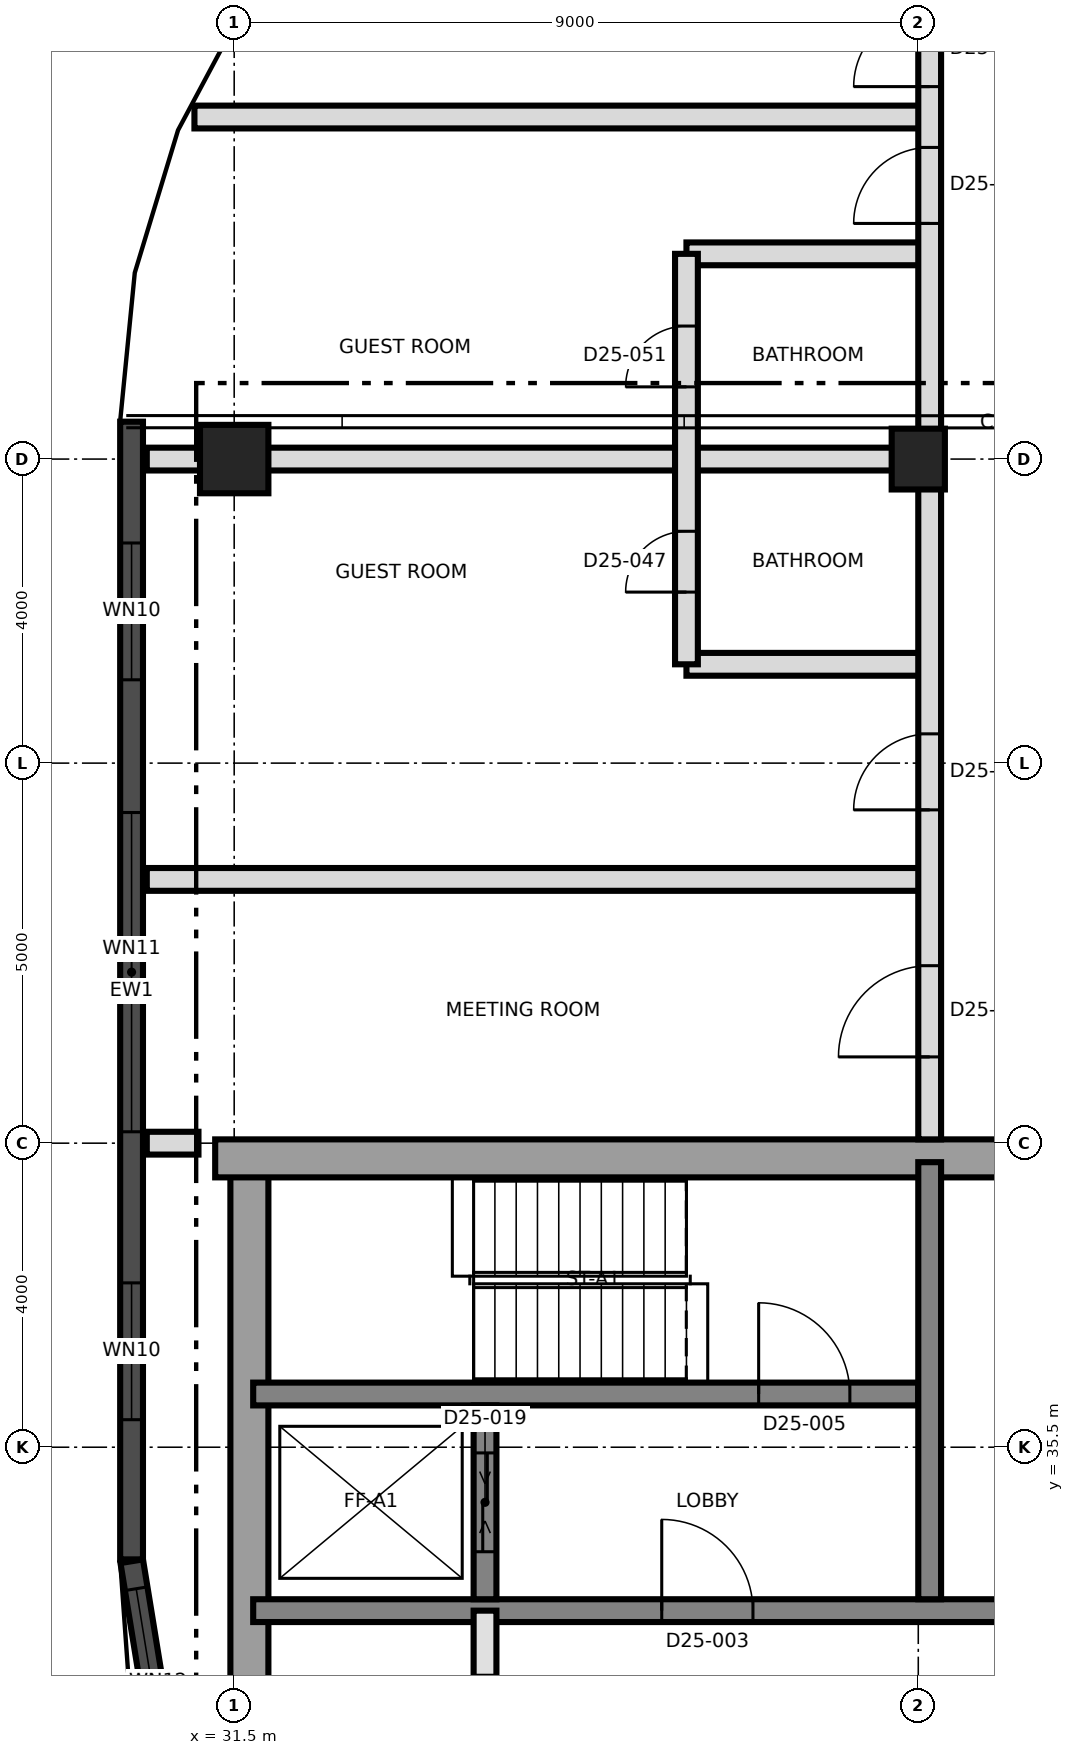
"""IFC4 building model, lengths in metres.
Left out: names, types, materials, properties, quantities, classifications, styles, units other than length and angle.
Written with IfcOpenShell. Run it as: python <this file> out.ifc"""

import sys

from ifc_helpers import new_model, si_unit, direction, frame, frame_2d, origin, origin_2d, place, context, subcontext, project, spatial, rectangle, extrude, element, fill, save


model = new_model("IFC4")
c1 = context("Model", 3, precision=1e-05, world=origin(), true_north=direction((0.0, 1.0)))
c2 = subcontext(c1, "Body", "Model", "MODEL_VIEW")
j1 = project(units=[si_unit("LENGTHUNIT", "METRE"), si_unit("PLANEANGLEUNIT", "RADIAN")], contexts=[c1])
p1 = place(None, origin())
s1 = spatial("IfcSite", under=j1, at=p1, CompositionType="ELEMENT")
p2 = place(p1, origin())
s2 = spatial("IfcBuilding", under=s1, at=p2, CompositionType="ELEMENT")
p3 = place(p2, frame((0.0, 0.0, 225.4)))
s3 = spatial("IfcBuildingStorey", under=s2, at=p3, CompositionType="ELEMENT", Elevation=225.4)
p4 = place(p3, frame((31.7, 21.75, 0.0), z_axis=(0.0, 0.0, 1.0), x_axis=(0.0, 1.0, 0.0)))
e1 = element("IfcWall", 1, at=p4, inside=s3, PredefinedType="SHEAR", context=c2, shape_type="SweptSolid", body=[
    extrude(rectangle(XDim=17.5, YDim=0.5, at=frame_2d((8.75, 0.0))), origin(), (0.0, 0.0, 1.0), 3.7),
])
p5 = place(p3, frame((31.25, 39.3, 0.0), z_axis=(0.0, 0.0, 1.0), x_axis=(1.0, 0.0, 0.0)))
e2 = element("IfcWall", 2, at=p5, inside=s3, PredefinedType="SHEAR", context=c2, shape_type="SweptSolid", body=[
    extrude(rectangle(XDim=27.0, YDim=0.5, at=frame_2d((13.5, 0.0))), origin(), (0.0, 0.0, 1.0), 3.7),
])
p6 = place(p5, frame((10.45, 0.0, 0.0)))
e3 = element("IfcOpeningElement", 3, at=p6, cuts=e2, PredefinedType="OPENING", context=c2, shape_type="SweptSolid", body=[
    extrude(rectangle(XDim=1.2, YDim=2.1, at=frame_2d((0.6, 1.05))), frame((0.0, 0.26, 0.0), z_axis=(0.0, -1.0, 0.0), x_axis=(1.0, 0.0, 0.0)), (0.0, 0.0, 1.0), 0.52),
])
p7 = place(p3, frame((31.75, 33.35, 0.0), z_axis=(0.0, 0.0, 1.0), x_axis=(1.0, 0.0, 0.0)))
e4 = element("IfcWall", 4, at=p7, inside=s3, PredefinedType="SHEAR", context=c2, shape_type="SweptSolid", body=[
    extrude(rectangle(XDim=26.5, YDim=0.3, at=frame_2d((13.25, 0.0))), origin(), (0.0, 0.0, 1.0), 3.7),
])
p8 = place(p7, frame((13.9, 0.0, 0.0)))
e5 = element("IfcOpeningElement", 5, at=p8, cuts=e4, PredefinedType="OPENING", context=c2, shape_type="SweptSolid", body=[
    extrude(rectangle(XDim=1.4, YDim=2.1, at=frame_2d((0.7, 1.05))), frame((0.0, 0.16, 0.0), z_axis=(0.0, -1.0, 0.0), x_axis=(1.0, 0.0, 0.0)), (0.0, 0.0, 1.0), 0.32),
])
p9 = place(p7, frame((5.375, 0.0, 0.0)))
e6 = element("IfcOpeningElement", 6, at=p9, cuts=e4, PredefinedType="OPENING", context=c2, shape_type="SweptSolid", body=[
    extrude(rectangle(XDim=1.2, YDim=2.1, at=frame_2d((0.6, 1.05))), frame((0.0, 0.16, 0.0), z_axis=(0.0, -1.0, 0.0), x_axis=(1.0, 0.0, 0.0)), (0.0, 0.0, 1.0), 0.32),
])
p10 = place(p7, frame((19.925, 0.0, 0.0)))
e7 = element("IfcOpeningElement", 7, at=p10, cuts=e4, PredefinedType="OPENING", context=c2, shape_type="SweptSolid", body=[
    extrude(rectangle(XDim=1.2, YDim=2.1, at=frame_2d((0.6, 1.05))), frame((0.0, 0.16, 0.0), z_axis=(0.0, -1.0, 0.0), x_axis=(1.0, 0.0, 0.0)), (0.0, 0.0, 1.0), 0.32),
])
p11 = place(p3, frame((31.75, 36.2, 0.0), z_axis=(0.0, 0.0, 1.0), x_axis=(1.0, 0.0, 0.0)))
e8 = element("IfcWall", 8, at=p11, inside=s3, PredefinedType="SHEAR", context=c2, shape_type="SweptSolid", body=[
    extrude(rectangle(XDim=8.75, YDim=0.3, at=frame_2d((4.375, 0.0))), origin(), (0.0, 0.0, 1.0), 3.7),
])
p12 = place(p11, frame((6.65, 0.0, 0.0)))
e9 = element("IfcOpeningElement", 9, at=p12, cuts=e8, PredefinedType="OPENING", context=c2, shape_type="SweptSolid", body=[
    extrude(rectangle(XDim=1.2, YDim=2.1, at=frame_2d((0.6, 1.05))), frame((0.0, 0.16, 0.0), z_axis=(0.0, -1.0, 0.0), x_axis=(1.0, 0.0, 0.0)), (0.0, 0.0, 1.0), 0.32),
])
p13 = place(p3, frame((40.65, 33.5, 0.0), z_axis=(0.0, 0.0, 1.0), x_axis=(0.0, 1.0, 0.0)))
e10 = element("IfcWall", 10, at=p13, inside=s3, PredefinedType="SHEAR", context=c2, shape_type="SweptSolid", body=[
    extrude(rectangle(XDim=5.75, YDim=0.3, at=frame_2d((2.875, 0.0))), origin(), (0.0, 0.0, 1.0), 3.7),
])
p14 = place(p3, frame((34.8, 33.5, 0.0), z_axis=(0.0, 0.0, 1.0), x_axis=(0.0, 1.0, 0.0)))
e11 = element("IfcWall", 11, at=p14, inside=s3, PredefinedType="SHEAR", context=c2, shape_type="SweptSolid", body=[
    extrude(rectangle(XDim=2.55, YDim=0.3, at=frame_2d((1.275, 0.0))), origin(), (0.0, 0.0, 1.0), 3.7),
])
p15 = place(p14, frame((0.625, 0.0, 0.0)))
e12 = element("IfcOpeningElement", 12, at=p15, cuts=e11, PredefinedType="OPENING", context=c2, shape_type="SweptSolid", body=[
    extrude(rectangle(XDim=1.3, YDim=2.4, at=frame_2d((0.65, 1.2))), frame((0.0, 0.16, 0.0), z_axis=(0.0, -1.0, 0.0), x_axis=(1.0, 0.0, 0.0)), (0.0, 0.0, 1.0), 0.32),
])
p16 = place(p3, frame((31.5, 48.5, 0.0), z_axis=(0.0, 0.0, 1.0), x_axis=(1.0, 0.0, 0.0)))
e13 = element("IfcColumn", 13, at=p16, inside=s3, PredefinedType="COLUMN", context=c2, shape_type="SweptSolid", body=[
    extrude(rectangle(XDim=0.9, YDim=0.9, at=origin_2d()), origin(), (0.0, 0.0, 1.0), 3.7),
])
p17 = place(p3, frame((40.5, 48.5, 0.0), z_axis=(0.0, 0.0, 1.0), x_axis=(0.0, 1.0, 0.0)))
e14 = element("IfcColumn", 14, at=p17, inside=s3, PredefinedType="COLUMN", context=c2, shape_type="SweptSolid", body=[
    extrude(rectangle(XDim=0.8, YDim=0.7, at=origin_2d()), origin(), (0.0, 0.0, 1.0), 3.7),
])
p18 = place(p3, frame((30.15, 48.992, 0.0), z_axis=(0.0, 0.0, 1.0), x_axis=(0.0, -1.0, 0.0)))
e15 = element("IfcWall", 15, at=p18, inside=s3, PredefinedType="SOLIDWALL", context=c2, shape_type="SweptSolid", body=[
    extrude(rectangle(XDim=14.968, YDim=0.3, at=frame_2d((7.484, 0.0))), origin(), (0.0, 0.0, 1.0), 3.4),
])
p19 = place(p18, frame((1.596, 0.0, 0.3)))
e16 = element("IfcOpeningElement", 16, at=p19, cuts=e15, PredefinedType="OPENING", context=c2, shape_type="SweptSolid", body=[
    extrude(rectangle(XDim=1.8, YDim=2.4, at=frame_2d((0.9, 1.2))), frame((0.0, 0.16, 0.0), z_axis=(0.0, -1.0, 0.0), x_axis=(1.0, 0.0, 0.0)), (0.0, 0.0, 1.0), 0.32),
])
p20 = place(p18, frame((5.142, 0.0, 0.9)))
e17 = element("IfcOpeningElement", 17, at=p20, cuts=e15, PredefinedType="OPENING", context=c2, shape_type="SweptSolid", body=[
    extrude(rectangle(XDim=4.2, YDim=1.5, at=frame_2d((2.1, 0.75))), frame((0.0, 0.16, 0.0), z_axis=(0.0, -1.0, 0.0), x_axis=(1.0, 0.0, 0.0)), (0.0, 0.0, 1.0), 0.32),
])
p21 = place(p18, frame((11.33, 0.0, 0.3)))
e18 = element("IfcOpeningElement", 18, at=p21, cuts=e15, PredefinedType="OPENING", context=c2, shape_type="SweptSolid", body=[
    extrude(rectangle(XDim=1.8, YDim=2.4, at=frame_2d((0.9, 1.2))), frame((0.0, 0.16, 0.0), z_axis=(0.0, -1.0, 0.0), x_axis=(1.0, 0.0, 0.0)), (0.0, 0.0, 1.0), 0.32),
])
p22 = place(p3, frame((30.152, 34.0, 0.0), z_axis=(0.0, 0.0, 1.0), x_axis=(0.160697303067, -0.987003736967, 0.0)))
e19 = element("IfcWall", 19, at=p22, inside=s3, PredefinedType="SOLIDWALL", context=c2, shape_type="SweptSolid", body=[
    extrude(rectangle(XDim=4.333, YDim=0.3, at=frame_2d((2.167, 0.0))), origin(), (0.0, 0.0, 1.0), 3.4),
])
p23 = place(p22, frame((0.366, 0.0, 0.9)))
e20 = element("IfcOpeningElement", 20, at=p23, cuts=e19, PredefinedType="OPENING", context=c2, shape_type="SweptSolid", body=[
    extrude(rectangle(XDim=3.6, YDim=1.5, at=frame_2d((1.8, 0.75))), frame((0.0, 0.16, 0.0), z_axis=(0.0, -1.0, 0.0), x_axis=(1.0, 0.0, 0.0)), (0.0, 0.0, 1.0), 0.32),
])
p24 = place(p3, frame((34.8, 30.65, 0.0), z_axis=(0.0, 0.0, 1.0), x_axis=(0.0, 1.0, 0.0)))
e21 = element("IfcWall", 21, at=p24, inside=s3, PredefinedType="SOLIDWALL", context=c2, shape_type="SweptSolid", body=[
    extrude(rectangle(XDim=2.7, YDim=0.3, at=frame_2d((1.35, 0.0))), origin(), (0.0, 0.0, 1.0), 3.4),
])
p25 = place(p24, frame((0.85, 0.0, 0.0)))
e22 = element("IfcOpeningElement", 22, at=p25, cuts=e21, PredefinedType="OPENING", context=c2, shape_type="SweptSolid", body=[
    extrude(rectangle(XDim=1.0, YDim=2.1, at=frame_2d((0.5, 1.05))), frame((0.0, 0.16, 0.0), z_axis=(0.0, -1.0, 0.0), x_axis=(1.0, 0.0, 0.0)), (0.0, 0.0, 1.0), 0.32),
])
p26 = place(p3, frame((30.35, 39.5, 0.0), z_axis=(0.0, 0.0, 1.0), x_axis=(1.0, 0.0, 0.0)))
e23 = element("IfcWall", 23, at=p26, inside=s3, PredefinedType="PARTITIONING", context=c2, shape_type="SweptSolid", body=[
    extrude(rectangle(XDim=0.68, YDim=0.3, at=frame_2d((0.34, 0.0))), origin(), (0.0, 0.0, 1.0), 3.4),
])
p27 = place(p3, frame((30.35, 42.97, 0.0), z_axis=(0.0, 0.0, 1.0), x_axis=(1.0, 0.0, 0.0)))
e24 = element("IfcWall", 24, at=p27, inside=s3, PredefinedType="PARTITIONING", context=c2, shape_type="SweptSolid", body=[
    extrude(rectangle(XDim=10.3, YDim=0.3, at=frame_2d((5.15, 0.0))), origin(), (0.0, 0.0, 1.0), 3.4),
])
p28 = place(p3, frame((37.45, 45.8, 0.0), z_axis=(0.0, 0.0, 1.0), x_axis=(1.0, 0.0, 0.0)))
e25 = element("IfcWall", 25, at=p28, inside=s3, PredefinedType="PARTITIONING", context=c2, shape_type="SweptSolid", body=[
    extrude(rectangle(XDim=3.2, YDim=0.3, at=frame_2d((1.6, 0.0))), origin(), (0.0, 0.0, 1.0), 3.4),
])
p29 = place(p3, frame((30.35, 48.5, 0.0), z_axis=(0.0, 0.0, 1.0), x_axis=(1.0, 0.0, 0.0)))
e26 = element("IfcWall", 26, at=p29, inside=s3, PredefinedType="PARTITIONING", context=c2, shape_type="SweptSolid", body=[
    extrude(rectangle(XDim=10.3, YDim=0.3, at=frame_2d((5.15, 0.0))), origin(), (0.0, 0.0, 1.0), 3.4),
])
p30 = place(p3, frame((37.45, 51.2, 0.0), z_axis=(0.0, 0.0, 1.0), x_axis=(1.0, 0.0, 0.0)))
e27 = element("IfcWall", 27, at=p30, inside=s3, PredefinedType="PARTITIONING", context=c2, shape_type="SweptSolid", body=[
    extrude(rectangle(XDim=3.2, YDim=0.3, at=frame_2d((1.6, 0.0))), origin(), (0.0, 0.0, 1.0), 3.4),
])
p31 = place(p3, frame((30.977, 53.0, 0.0), z_axis=(0.0, 0.0, 1.0), x_axis=(1.0, 0.0, 0.0)))
e28 = element("IfcWall", 28, at=p31, inside=s3, PredefinedType="PARTITIONING", context=c2, shape_type="SweptSolid", body=[
    extrude(rectangle(XDim=9.673, YDim=0.3, at=frame_2d((4.836, 0.0))), origin(), (0.0, 0.0, 1.0), 3.4),
])
p32 = place(p3, frame((37.45, 45.8, 0.0), z_axis=(0.0, 0.0, 1.0), x_axis=(0.0, 1.0, 0.0)))
e29 = element("IfcWall", 29, at=p32, inside=s3, PredefinedType="PARTITIONING", context=c2, shape_type="SweptSolid", body=[
    extrude(rectangle(XDim=5.4, YDim=0.3, at=frame_2d((2.7, 0.0))), origin(), (0.0, 0.0, 1.0), 3.4),
])
p33 = place(p32, frame((0.95, 0.0, 0.0)))
e30 = element("IfcOpeningElement", 30, at=p33, cuts=e29, PredefinedType="OPENING", context=c2, shape_type="SweptSolid", body=[
    extrude(rectangle(XDim=0.8, YDim=2.1, at=frame_2d((0.4, 1.05))), frame((0.0, 0.16, 0.0), z_axis=(0.0, -1.0, 0.0), x_axis=(1.0, 0.0, 0.0)), (0.0, 0.0, 1.0), 0.32),
])
p34 = place(p32, frame((3.65, 0.0, 0.0)))
e31 = element("IfcOpeningElement", 31, at=p34, cuts=e29, PredefinedType="OPENING", context=c2, shape_type="SweptSolid", body=[
    extrude(rectangle(XDim=0.8, YDim=2.1, at=frame_2d((0.4, 1.05))), frame((0.0, 0.16, 0.0), z_axis=(0.0, -1.0, 0.0), x_axis=(1.0, 0.0, 0.0)), (0.0, 0.0, 1.0), 0.32),
])
p35 = place(p3, frame((40.65, 39.55, 0.0), z_axis=(0.0, 0.0, 1.0), x_axis=(0.0, 1.0, 0.0)))
e32 = element("IfcWall", 32, at=p35, inside=s3, PredefinedType="PARTITIONING", context=c2, shape_type="SweptSolid", body=[
    extrude(rectangle(XDim=19.0, YDim=0.3, at=frame_2d((9.5, 0.0))), origin(), (0.0, 0.0, 1.0), 3.4),
])
p36 = place(p35, frame((1.085, 0.0, 0.0)))
e33 = element("IfcOpeningElement", 33, at=p36, cuts=e32, PredefinedType="OPENING", context=c2, shape_type="SweptSolid", body=[
    extrude(rectangle(XDim=1.2, YDim=2.1, at=frame_2d((0.6, 1.05))), frame((0.0, 0.16, 0.0), z_axis=(0.0, -1.0, 0.0), x_axis=(1.0, 0.0, 0.0)), (0.0, 0.0, 1.0), 0.32),
])
p37 = place(p35, frame((4.335, 0.0, 0.0)))
e34 = element("IfcOpeningElement", 34, at=p37, cuts=e32, PredefinedType="OPENING", context=c2, shape_type="SweptSolid", body=[
    extrude(rectangle(XDim=1.0, YDim=2.1, at=frame_2d((0.5, 1.05))), frame((0.0, 0.16, 0.0), z_axis=(0.0, -1.0, 0.0), x_axis=(1.0, 0.0, 0.0)), (0.0, 0.0, 1.0), 0.32),
])
p38 = place(p35, frame((12.05, 0.0, 0.0)))
e35 = element("IfcOpeningElement", 35, at=p38, cuts=e32, PredefinedType="OPENING", context=c2, shape_type="SweptSolid", body=[
    extrude(rectangle(XDim=1.0, YDim=2.1, at=frame_2d((0.5, 1.05))), frame((0.0, 0.16, 0.0), z_axis=(0.0, -1.0, 0.0), x_axis=(1.0, 0.0, 0.0)), (0.0, 0.0, 1.0), 0.32),
])
p39 = place(p35, frame((13.85, 0.0, 0.0)))
e36 = element("IfcOpeningElement", 36, at=p39, cuts=e32, PredefinedType="OPENING", context=c2, shape_type="SweptSolid", body=[
    extrude(rectangle(XDim=1.0, YDim=2.1, at=frame_2d((0.5, 1.05))), frame((0.0, 0.16, 0.0), z_axis=(0.0, -1.0, 0.0), x_axis=(1.0, 0.0, 0.0)), (0.0, 0.0, 1.0), 0.32),
])
p40 = place(p19, origin())
e37 = element("IfcWindow", 37, at=p40, inside=s3, PartitioningType="SINGLE_PANEL", PredefinedType="WINDOW", context=c2, shape_type="SweptSolid", body=[
    extrude(rectangle(XDim=1.8, YDim=2.4, at=frame_2d((0.9, 1.2))), frame((0.0, 0.03, 0.0), z_axis=(0.0, -1.0, 0.0), x_axis=(1.0, 0.0, 0.0)), (0.0, 0.0, 1.0), 0.06),
])
fill(e16, e37)
p41 = place(p20, origin())
e38 = element("IfcWindow", 38, at=p41, inside=s3, PartitioningType="SINGLE_PANEL", PredefinedType="WINDOW", context=c2, shape_type="SweptSolid", body=[
    extrude(rectangle(XDim=4.2, YDim=1.5, at=frame_2d((2.1, 0.75))), frame((0.0, 0.03, 0.0), z_axis=(0.0, -1.0, 0.0), x_axis=(1.0, 0.0, 0.0)), (0.0, 0.0, 1.0), 0.06),
])
fill(e17, e38)
p42 = place(p21, origin())
e39 = element("IfcWindow", 39, at=p42, inside=s3, PartitioningType="SINGLE_PANEL", PredefinedType="WINDOW", context=c2, shape_type="SweptSolid", body=[
    extrude(rectangle(XDim=1.8, YDim=2.4, at=frame_2d((0.9, 1.2))), frame((0.0, 0.03, 0.0), z_axis=(0.0, -1.0, 0.0), x_axis=(1.0, 0.0, 0.0)), (0.0, 0.0, 1.0), 0.06),
])
fill(e18, e39)
p43 = place(p23, origin())
e40 = element("IfcWindow", 40, at=p43, inside=s3, PartitioningType="SINGLE_PANEL", PredefinedType="WINDOW", context=c2, shape_type="SweptSolid", body=[
    extrude(rectangle(XDim=3.6, YDim=1.5, at=frame_2d((1.8, 0.75))), frame((0.0, 0.03, 0.0), z_axis=(0.0, -1.0, 0.0), x_axis=(1.0, 0.0, 0.0)), (0.0, 0.0, 1.0), 0.06),
])
fill(e20, e40)
p44 = place(p9, origin())
e41 = element("IfcDoor", 41, at=p44, inside=s3, OperationType="SINGLE_SWING_LEFT", PredefinedType="DOOR", context=c2, shape_type="SweptSolid", body=[
    extrude(rectangle(XDim=1.2, YDim=2.1, at=frame_2d((0.6, 1.05))), frame((0.0, 0.025, 0.0), z_axis=(0.0, -1.0, 0.0), x_axis=(1.0, 0.0, 0.0)), (0.0, 0.0, 1.0), 0.05),
])
fill(e6, e41)
p45 = place(p12, origin())
e42 = element("IfcDoor", 42, at=p45, inside=s3, OperationType="SINGLE_SWING_RIGHT", PredefinedType="DOOR", context=c2, shape_type="SweptSolid", body=[
    extrude(rectangle(XDim=1.2, YDim=2.1, at=frame_2d((0.6, 1.05))), frame((0.0, 0.025, 0.0), z_axis=(0.0, -1.0, 0.0), x_axis=(1.0, 0.0, 0.0)), (0.0, 0.0, 1.0), 0.05),
])
fill(e9, e42)
p46 = place(p15, origin())
e43 = element("IfcDoor", 43, at=p46, inside=s3, OperationType="SLIDING_TO_LEFT", PredefinedType="DOOR", context=c2, shape_type="SweptSolid", body=[
    extrude(rectangle(XDim=1.3, YDim=2.4, at=frame_2d((0.65, 1.2))), frame((0.0, 0.025, 0.0), z_axis=(0.0, -1.0, 0.0), x_axis=(1.0, 0.0, 0.0)), (0.0, 0.0, 1.0), 0.05),
])
fill(e12, e43)
p47 = place(p36, origin())
e44 = element("IfcDoor", 44, at=p47, inside=s3, OperationType="SINGLE_SWING_RIGHT", PredefinedType="DOOR", context=c2, shape_type="SweptSolid", body=[
    extrude(rectangle(XDim=1.2, YDim=2.1, at=frame_2d((0.6, 1.05))), frame((0.0, 0.025, 0.0), z_axis=(0.0, -1.0, 0.0), x_axis=(1.0, 0.0, 0.0)), (0.0, 0.0, 1.0), 0.05),
])
fill(e33, e44)
p48 = place(p33, origin())
e45 = element("IfcDoor", 45, at=p48, inside=s3, OperationType="SINGLE_SWING_LEFT", PredefinedType="DOOR", context=c2, shape_type="SweptSolid", body=[
    extrude(rectangle(XDim=0.8, YDim=2.1, at=frame_2d((0.4, 1.05))), frame((0.0, 0.025, 0.0), z_axis=(0.0, -1.0, 0.0), x_axis=(1.0, 0.0, 0.0)), (0.0, 0.0, 1.0), 0.05),
])
fill(e30, e45)
p49 = place(p37, origin())
e46 = element("IfcDoor", 46, at=p49, inside=s3, OperationType="SINGLE_SWING_LEFT", PredefinedType="DOOR", context=c2, shape_type="SweptSolid", body=[
    extrude(rectangle(XDim=1.0, YDim=2.1, at=frame_2d((0.5, 1.05))), frame((0.0, 0.025, 0.0), z_axis=(0.0, -1.0, 0.0), x_axis=(1.0, 0.0, 0.0)), (0.0, 0.0, 1.0), 0.05),
])
fill(e34, e46)
p50 = place(p34, origin())
e47 = element("IfcDoor", 47, at=p50, inside=s3, OperationType="SINGLE_SWING_RIGHT", PredefinedType="DOOR", context=c2, shape_type="SweptSolid", body=[
    extrude(rectangle(XDim=0.8, YDim=2.1, at=frame_2d((0.4, 1.05))), frame((0.0, 0.025, 0.0), z_axis=(0.0, -1.0, 0.0), x_axis=(1.0, 0.0, 0.0)), (0.0, 0.0, 1.0), 0.05),
])
fill(e31, e47)
p51 = place(p38, origin())
e48 = element("IfcDoor", 48, at=p51, inside=s3, OperationType="SINGLE_SWING_LEFT", PredefinedType="DOOR", context=c2, shape_type="SweptSolid", body=[
    extrude(rectangle(XDim=1.0, YDim=2.1, at=frame_2d((0.5, 1.05))), frame((0.0, 0.025, 0.0), z_axis=(0.0, -1.0, 0.0), x_axis=(1.0, 0.0, 0.0)), (0.0, 0.0, 1.0), 0.05),
])
fill(e35, e48)
p52 = place(p39, origin())
e49 = element("IfcDoor", 49, at=p52, inside=s3, OperationType="SINGLE_SWING_LEFT", PredefinedType="DOOR", context=c2, shape_type="SweptSolid", body=[
    extrude(rectangle(XDim=1.0, YDim=2.1, at=frame_2d((0.5, 1.05))), frame((0.0, 0.025, 0.0), z_axis=(0.0, -1.0, 0.0), x_axis=(1.0, 0.0, 0.0)), (0.0, 0.0, 1.0), 0.05),
])
fill(e36, e49)
save(model, sys.argv[1])
